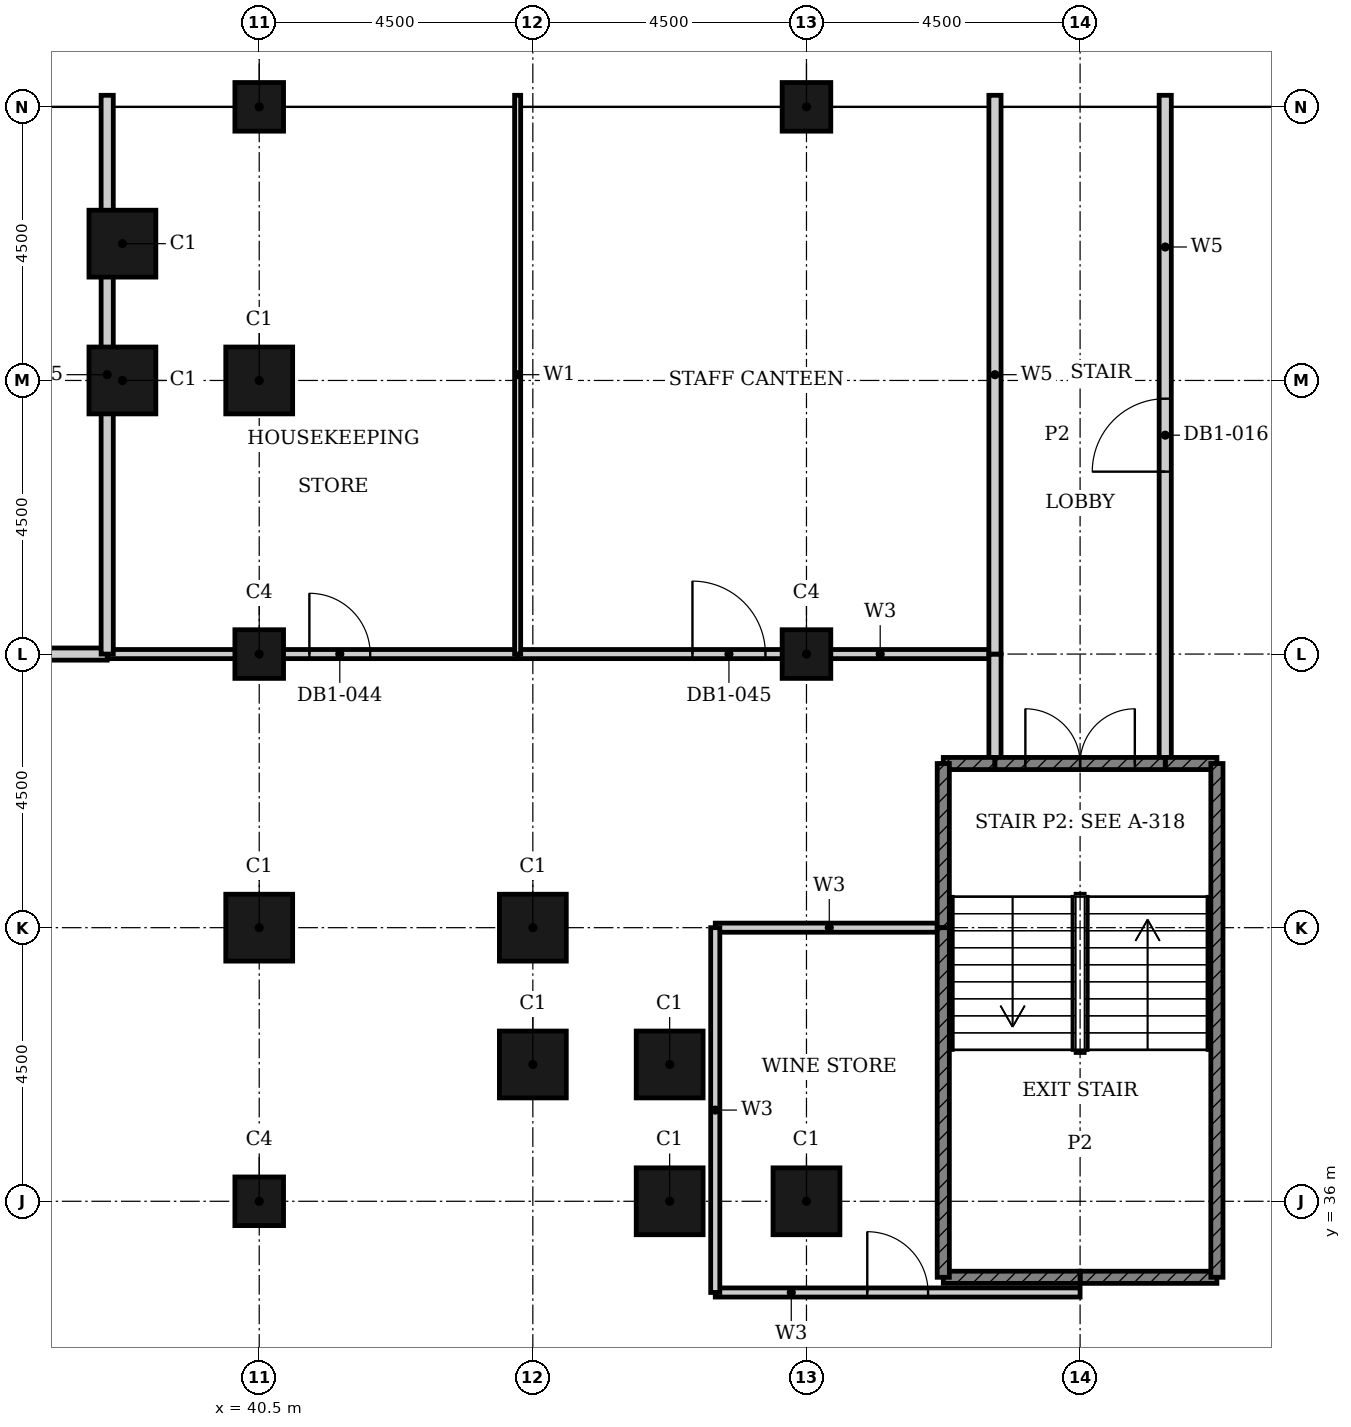
"""IFC4 building model, lengths in metres.
Left out: names, types, materials, properties, quantities, classifications, styles, units other than length and angle.
Written with IfcOpenShell. Run it as: python <this file> out.ifc"""

import sys

from ifc_helpers import new_model, si_unit, direction, frame, frame_2d, origin, origin_2d, place, context, subcontext, project, spatial, rectangle, hollow_rectangle, extrude, element, fill, save


model = new_model("IFC4")
c1 = context("Model", 3, precision=1e-05, world=origin(), true_north=direction((0.0, 1.0)))
c2 = subcontext(c1, "Body", "Model", "MODEL_VIEW")
j1 = project(units=[si_unit("LENGTHUNIT", "METRE"), si_unit("PLANEANGLEUNIT", "RADIAN")], contexts=[c1])
p1 = place(None, origin())
s1 = spatial("IfcSite", under=j1, at=p1, CompositionType="ELEMENT")
p2 = place(p1, origin())
s2 = spatial("IfcBuilding", under=s1, at=p2, CompositionType="ELEMENT")
p3 = place(p2, frame((0.0, 0.0, -6.0)))
s3 = spatial("IfcBuildingStorey", under=s2, at=p3, CompositionType="ELEMENT", Elevation=-6.0)
for number, where, z_axis, x_axis in (
    (1, (49.5, 36.0, -0.5), (0.0, 0.0, 1.0), (1.0, 0.0, 0.0)),
    (2, (47.25, 36.0, -0.5), (0.0, 0.0, 1.0), (1.0, 0.0, 0.0)),
    (3, (47.25, 38.25, -0.5), (0.0, 0.0, 1.0), (1.0, 0.0, 0.0)),
    (4, (45.0, 38.25, -0.5), (0.0, 0.0, 1.0), (1.0, 0.0, 0.0)),
    (5, (45.0, 40.5, -0.5), (0.0, 0.0, 1.0), (1.0, 0.0, 0.0)),
    (6, (40.5, 40.5, -0.5), (0.0, 0.0, 1.0), (1.0, 0.0, 0.0)),
    (7, (40.5, 49.5, -0.5), (0.0, 0.0, 1.0), (1.0, 0.0, 0.0)),
    (8, (38.25, 49.5, -0.5), (0.0, 0.0, 1.0), (1.0, 0.0, 0.0)),
    (9, (38.25, 51.75, -0.5), (0.0, 0.0, 1.0), (1.0, 0.0, 0.0)),
):
    element("IfcColumn", number, at=place(p3, frame(where, z_axis=z_axis, x_axis=x_axis)), inside=s3, PredefinedType="COLUMN", context=c2, shape_type="SweptSolid", body=[
        extrude(hollow_rectangle(XDim=1.1, YDim=1.1, WallThickness=0.036, at=origin_2d()), origin(), (0.0, 0.0, 1.0), 6.5),
    ])
for number, where, z_axis, x_axis in (
    (10, (40.5, 54.0, -0.5), (0.0, 0.0, 1.0), (1.0, 0.0, 0.0)),
    (11, (49.5, 54.0, -0.5), (0.0, 0.0, 1.0), (1.0, 0.0, 0.0)),
    (12, (40.5, 36.0, -0.5), (0.0, 0.0, 1.0), (1.0, 0.0, 0.0)),
    (13, (40.5, 45.0, -0.5), (0.0, 0.0, 1.0), (1.0, 0.0, 0.0)),
    (14, (49.5, 45.0, -0.5), (0.0, 0.0, 1.0), (1.0, 0.0, 0.0)),
):
    element("IfcColumn", number, at=place(p3, frame(where, z_axis=z_axis, x_axis=x_axis)), inside=s3, PredefinedType="COLUMN", context=c2, shape_type="SweptSolid", body=[
        extrude(hollow_rectangle(XDim=0.8, YDim=0.8, WallThickness=0.025, at=origin_2d()), origin(), (0.0, 0.0, 1.0), 6.5),
    ])
p4 = place(p3, frame((48.0, 34.5, 0.0), z_axis=(0.0, 0.0, 1.0), x_axis=(1.0, 0.0, 0.0)))
e15 = element("IfcWall", 15, at=p4, inside=s3, PredefinedType="PARTITIONING", context=c2, shape_type="SweptSolid", body=[
    extrude(rectangle(XDim=6.0, YDim=0.15, at=frame_2d((3.0, 0.0))), origin(), (0.0, 0.0, 1.0), 5.6),
])
p5 = place(p4, frame((2.5, 0.0, 0.0)))
e16 = element("IfcOpeningElement", 16, at=p5, cuts=e15, PredefinedType="OPENING", context=c2, shape_type="SweptSolid", body=[
    extrude(rectangle(XDim=1.0, YDim=2.1, at=frame_2d((0.5, 1.05))), frame((0.0, 0.085, 0.0), z_axis=(0.0, -1.0, 0.0), x_axis=(1.0, 0.0, 0.0)), (0.0, 0.0, 1.0), 0.17),
])
p6 = place(p3, frame((48.0, 40.5, 0.0), z_axis=(0.0, 0.0, 1.0), x_axis=(1.0, 0.0, 0.0)))
e17 = element("IfcWall", 17, at=p6, inside=s3, PredefinedType="PARTITIONING", context=c2, shape_type="SweptSolid", body=[
    extrude(rectangle(XDim=3.75, YDim=0.15, at=frame_2d((1.875, 0.0))), origin(), (0.0, 0.0, 1.0), 5.6),
])
p7 = place(p3, frame((38.0, 45.0, 0.0), z_axis=(0.0, 0.0, 1.0), x_axis=(1.0, 0.0, 0.0)))
e18 = element("IfcWall", 18, at=p7, inside=s3, PredefinedType="PARTITIONING", context=c2, shape_type="SweptSolid", body=[
    extrude(rectangle(XDim=6.75, YDim=0.15, at=frame_2d((3.375, 0.0))), origin(), (0.0, 0.0, 1.0), 5.6),
])
p8 = place(p7, frame((3.325, 0.0, 0.0)))
e19 = element("IfcOpeningElement", 19, at=p8, cuts=e18, PredefinedType="OPENING", context=c2, shape_type="SweptSolid", body=[
    extrude(rectangle(XDim=1.0, YDim=2.1, at=frame_2d((0.5, 1.05))), frame((0.0, 0.085, 0.0), z_axis=(0.0, -1.0, 0.0), x_axis=(1.0, 0.0, 0.0)), (0.0, 0.0, 1.0), 0.17),
])
p9 = place(p3, frame((44.75, 45.0, 0.0), z_axis=(0.0, 0.0, 1.0), x_axis=(1.0, 0.0, 0.0)))
e20 = element("IfcWall", 20, at=p9, inside=s3, PredefinedType="PARTITIONING", context=c2, shape_type="SweptSolid", body=[
    extrude(rectangle(XDim=7.85, YDim=0.15, at=frame_2d((3.925, 0.0))), origin(), (0.0, 0.0, 1.0), 5.6),
])
p10 = place(p9, frame((2.875, 0.0, 0.0)))
e21 = element("IfcOpeningElement", 21, at=p10, cuts=e20, PredefinedType="OPENING", context=c2, shape_type="SweptSolid", body=[
    extrude(rectangle(XDim=1.2, YDim=2.4, at=frame_2d((0.6, 1.2))), frame((0.0, 0.085, 0.0), z_axis=(0.0, -1.0, 0.0), x_axis=(1.0, 0.0, 0.0)), (0.0, 0.0, 1.0), 0.17),
])
p11 = place(p3, frame((48.0, 34.5, 0.0), z_axis=(0.0, 0.0, 1.0), x_axis=(0.0, 1.0, 0.0)))
e22 = element("IfcWall", 22, at=p11, inside=s3, PredefinedType="PARTITIONING", context=c2, shape_type="SweptSolid", body=[
    extrude(rectangle(XDim=6.0, YDim=0.15, at=frame_2d((3.0, 0.0))), origin(), (0.0, 0.0, 1.0), 5.6),
])
p12 = place(p3, frame((44.75, 45.0, 0.0), z_axis=(0.0, 0.0, 1.0), x_axis=(0.0, 1.0, 0.0)))
e23 = element("IfcWall", 23, at=p12, inside=s3, PredefinedType="PARTITIONING", context=c2, shape_type="SweptSolid", body=[
    extrude(rectangle(XDim=9.19, YDim=0.1, at=frame_2d((4.595, 0.0))), origin(), (0.0, 0.0, 1.0), 5.6),
])
p13 = place(p3, frame((28.0, 45.0, 0.0), z_axis=(0.0, 0.0, 1.0), x_axis=(1.0, 0.0, 0.0)))
e24 = element("IfcWall", 24, at=p13, inside=s3, PredefinedType="PARTITIONING", context=c2, shape_type="SweptSolid", body=[
    extrude(rectangle(XDim=10.0, YDim=0.2, at=frame_2d((5.0, 0.0))), origin(), (0.0, 0.0, 1.0), 5.6),
])
p14 = place(p13, frame((4.4, 0.0, 0.0)))
e25 = element("IfcOpeningElement", 25, at=p14, cuts=e24, PredefinedType="OPENING", context=c2, shape_type="SweptSolid", body=[
    extrude(rectangle(XDim=1.2, YDim=2.1, at=frame_2d((0.6, 1.05))), frame((0.0, 0.11, 0.0), z_axis=(0.0, -1.0, 0.0), x_axis=(1.0, 0.0, 0.0)), (0.0, 0.0, 1.0), 0.22),
])
p15 = place(p3, frame((38.0, 45.0, 0.0), z_axis=(0.0, 0.0, 1.0), x_axis=(0.0, 1.0, 0.0)))
e26 = element("IfcWall", 26, at=p15, inside=s3, PredefinedType="PARTITIONING", context=c2, shape_type="SweptSolid", body=[
    extrude(rectangle(XDim=9.19, YDim=0.2, at=frame_2d((4.595, 0.0))), origin(), (0.0, 0.0, 1.0), 5.6),
])
p16 = place(p3, frame((52.6, 43.2, 0.0), z_axis=(0.0, 0.0, 1.0), x_axis=(0.0, 1.0, 0.0)))
e27 = element("IfcWall", 27, at=p16, inside=s3, PredefinedType="PARTITIONING", context=c2, shape_type="SweptSolid", body=[
    extrude(rectangle(XDim=1.8, YDim=0.2, at=frame_2d((0.9, 0.0))), origin(), (0.0, 0.0, 1.0), 5.6),
])
p17 = place(p3, frame((52.6, 45.0, 0.0), z_axis=(0.0, 0.0, 1.0), x_axis=(0.0, 1.0, 0.0)))
e28 = element("IfcWall", 28, at=p17, inside=s3, PredefinedType="PARTITIONING", context=c2, shape_type="SweptSolid", body=[
    extrude(rectangle(XDim=9.19, YDim=0.2, at=frame_2d((4.595, 0.0))), origin(), (0.0, 0.0, 1.0), 5.6),
])
p18 = place(p3, frame((55.4, 43.2, 0.0), z_axis=(0.0, 0.0, 1.0), x_axis=(0.0, 1.0, 0.0)))
e29 = element("IfcWall", 29, at=p18, inside=s3, PredefinedType="PARTITIONING", context=c2, shape_type="SweptSolid", body=[
    extrude(rectangle(XDim=10.99, YDim=0.2, at=frame_2d((5.495, 0.0))), origin(), (0.0, 0.0, 1.0), 5.6),
])
p19 = place(p18, frame((4.8, 0.0, 0.0)))
e30 = element("IfcOpeningElement", 30, at=p19, cuts=e29, PredefinedType="OPENING", context=c2, shape_type="SweptSolid", body=[
    extrude(rectangle(XDim=1.2, YDim=2.1, at=frame_2d((0.6, 1.05))), frame((0.0, 0.11, 0.0), z_axis=(0.0, -1.0, 0.0), x_axis=(1.0, 0.0, 0.0)), (0.0, 0.0, 1.0), 0.22),
])
for number, where, z_axis, x_axis in (
    (31, (54.0, 34.75, 0.0), (0.0, 0.0, 1.0), (1.0, 0.0, 0.0)),
    (32, (51.75, 34.75, 0.0), (0.0, 0.0, 1.0), (1.0, 0.0, 0.0)),
):
    element("IfcWall", number, at=place(p3, frame(where, z_axis=z_axis, x_axis=x_axis)), inside=s3, PredefinedType="SHEAR", context=c2, shape_type="SweptSolid", body=[
        extrude(rectangle(XDim=2.25, YDim=0.2, at=frame_2d((1.125, 0.0))), origin(), (0.0, 0.0, 1.0), 5.6),
    ])
for number, where, z_axis, x_axis in (
    (33, (51.75, 43.2, 0.0), (0.0, 0.0, 1.0), (1.0, 0.0, 0.0)),
    (34, (55.4, 43.2, 0.0), (0.0, 0.0, 1.0), (1.0, 0.0, 0.0)),
):
    element("IfcWall", number, at=place(p3, frame(where, z_axis=z_axis, x_axis=x_axis)), inside=s3, PredefinedType="SHEAR", context=c2, shape_type="SweptSolid", body=[
        extrude(rectangle(XDim=0.85, YDim=0.2, at=frame_2d((0.425, 0.0))), origin(), (0.0, 0.0, 1.0), 5.6),
    ])
p20 = place(p3, frame((52.6, 43.2, 0.0), z_axis=(0.0, 0.0, 1.0), x_axis=(1.0, 0.0, 0.0)))
e35 = element("IfcWall", 35, at=p20, inside=s3, PredefinedType="SHEAR", context=c2, shape_type="SweptSolid", body=[
    extrude(rectangle(XDim=2.8, YDim=0.2, at=frame_2d((1.4, 0.0))), origin(), (0.0, 0.0, 1.0), 5.6),
])
p21 = place(p20, frame((0.5, 0.0, 0.0)))
e36 = element("IfcOpeningElement", 36, at=p21, cuts=e35, PredefinedType="OPENING", context=c2, shape_type="SweptSolid", body=[
    extrude(rectangle(XDim=1.8, YDim=2.1, at=frame_2d((0.9, 1.05))), frame((0.0, 0.11, 0.0), z_axis=(0.0, -1.0, 0.0), x_axis=(1.0, 0.0, 0.0)), (0.0, 0.0, 1.0), 0.22),
])
p22 = place(p3, frame((51.75, 40.5, 0.0), z_axis=(0.0, 0.0, 1.0), x_axis=(0.0, 1.0, 0.0)))
e37 = element("IfcWall", 37, at=p22, inside=s3, PredefinedType="SHEAR", context=c2, shape_type="SweptSolid", body=[
    extrude(rectangle(XDim=2.7, YDim=0.2, at=frame_2d((1.35, 0.0))), origin(), (0.0, 0.0, 1.0), 5.6),
])
p23 = place(p3, frame((51.75, 34.75, 0.0), z_axis=(0.0, 0.0, 1.0), x_axis=(0.0, 1.0, 0.0)))
e38 = element("IfcWall", 38, at=p23, inside=s3, PredefinedType="SHEAR", context=c2, shape_type="SweptSolid", body=[
    extrude(rectangle(XDim=5.75, YDim=0.2, at=frame_2d((2.875, 0.0))), origin(), (0.0, 0.0, 1.0), 5.6),
])
p24 = place(p3, frame((56.25, 34.75, 0.0), z_axis=(0.0, 0.0, 1.0), x_axis=(0.0, 1.0, 0.0)))
e39 = element("IfcWall", 39, at=p24, inside=s3, PredefinedType="SHEAR", context=c2, shape_type="SweptSolid", body=[
    extrude(rectangle(XDim=8.45, YDim=0.2, at=frame_2d((4.225, 0.0))), origin(), (0.0, 0.0, 1.0), 5.6),
])
p25 = place(p19, origin())
e40 = element("IfcDoor", 40, at=p25, inside=s3, OperationType="SINGLE_SWING_LEFT", PredefinedType="DOOR", context=c2, shape_type="SweptSolid", body=[
    extrude(rectangle(XDim=1.2, YDim=2.1, at=frame_2d((0.6, 1.05))), frame((0.0, 0.025, 0.0), z_axis=(0.0, -1.0, 0.0), x_axis=(1.0, 0.0, 0.0)), (0.0, 0.0, 1.0), 0.05),
])
fill(e30, e40)
p26 = place(p21, origin())
e41 = element("IfcDoor", 41, at=p26, inside=s3, OperationType="DOUBLE_DOOR_SINGLE_SWING", PredefinedType="DOOR", context=c2, shape_type="SweptSolid", body=[
    extrude(rectangle(XDim=1.8, YDim=2.1, at=frame_2d((0.9, 1.05))), frame((0.0, 0.025, 0.0), z_axis=(0.0, -1.0, 0.0), x_axis=(1.0, 0.0, 0.0)), (0.0, 0.0, 1.0), 0.05),
])
fill(e36, e41)
p27 = place(p8, origin())
e42 = element("IfcDoor", 42, at=p27, inside=s3, OperationType="SINGLE_SWING_RIGHT", PredefinedType="DOOR", context=c2, shape_type="SweptSolid", body=[
    extrude(rectangle(XDim=1.0, YDim=2.1, at=frame_2d((0.5, 1.05))), frame((0.0, 0.025, 0.0), z_axis=(0.0, -1.0, 0.0), x_axis=(1.0, 0.0, 0.0)), (0.0, 0.0, 1.0), 0.05),
])
fill(e19, e42)
p28 = place(p10, origin())
e43 = element("IfcDoor", 43, at=p28, inside=s3, OperationType="SINGLE_SWING_LEFT", PredefinedType="DOOR", context=c2, shape_type="SweptSolid", body=[
    extrude(rectangle(XDim=1.2, YDim=2.4, at=frame_2d((0.6, 1.2))), frame((0.0, 0.025, 0.0), z_axis=(0.0, -1.0, 0.0), x_axis=(1.0, 0.0, 0.0)), (0.0, 0.0, 1.0), 0.05),
])
fill(e21, e43)
p29 = place(p5, origin())
e44 = element("IfcDoor", 44, at=p29, inside=s3, OperationType="SINGLE_SWING_RIGHT", PredefinedType="DOOR", context=c2, shape_type="SweptSolid", body=[
    extrude(rectangle(XDim=1.0, YDim=2.1, at=frame_2d((0.5, 1.05))), frame((0.0, 0.025, 0.0), z_axis=(0.0, -1.0, 0.0), x_axis=(1.0, 0.0, 0.0)), (0.0, 0.0, 1.0), 0.05),
])
fill(e16, e44)
save(model, sys.argv[1])
